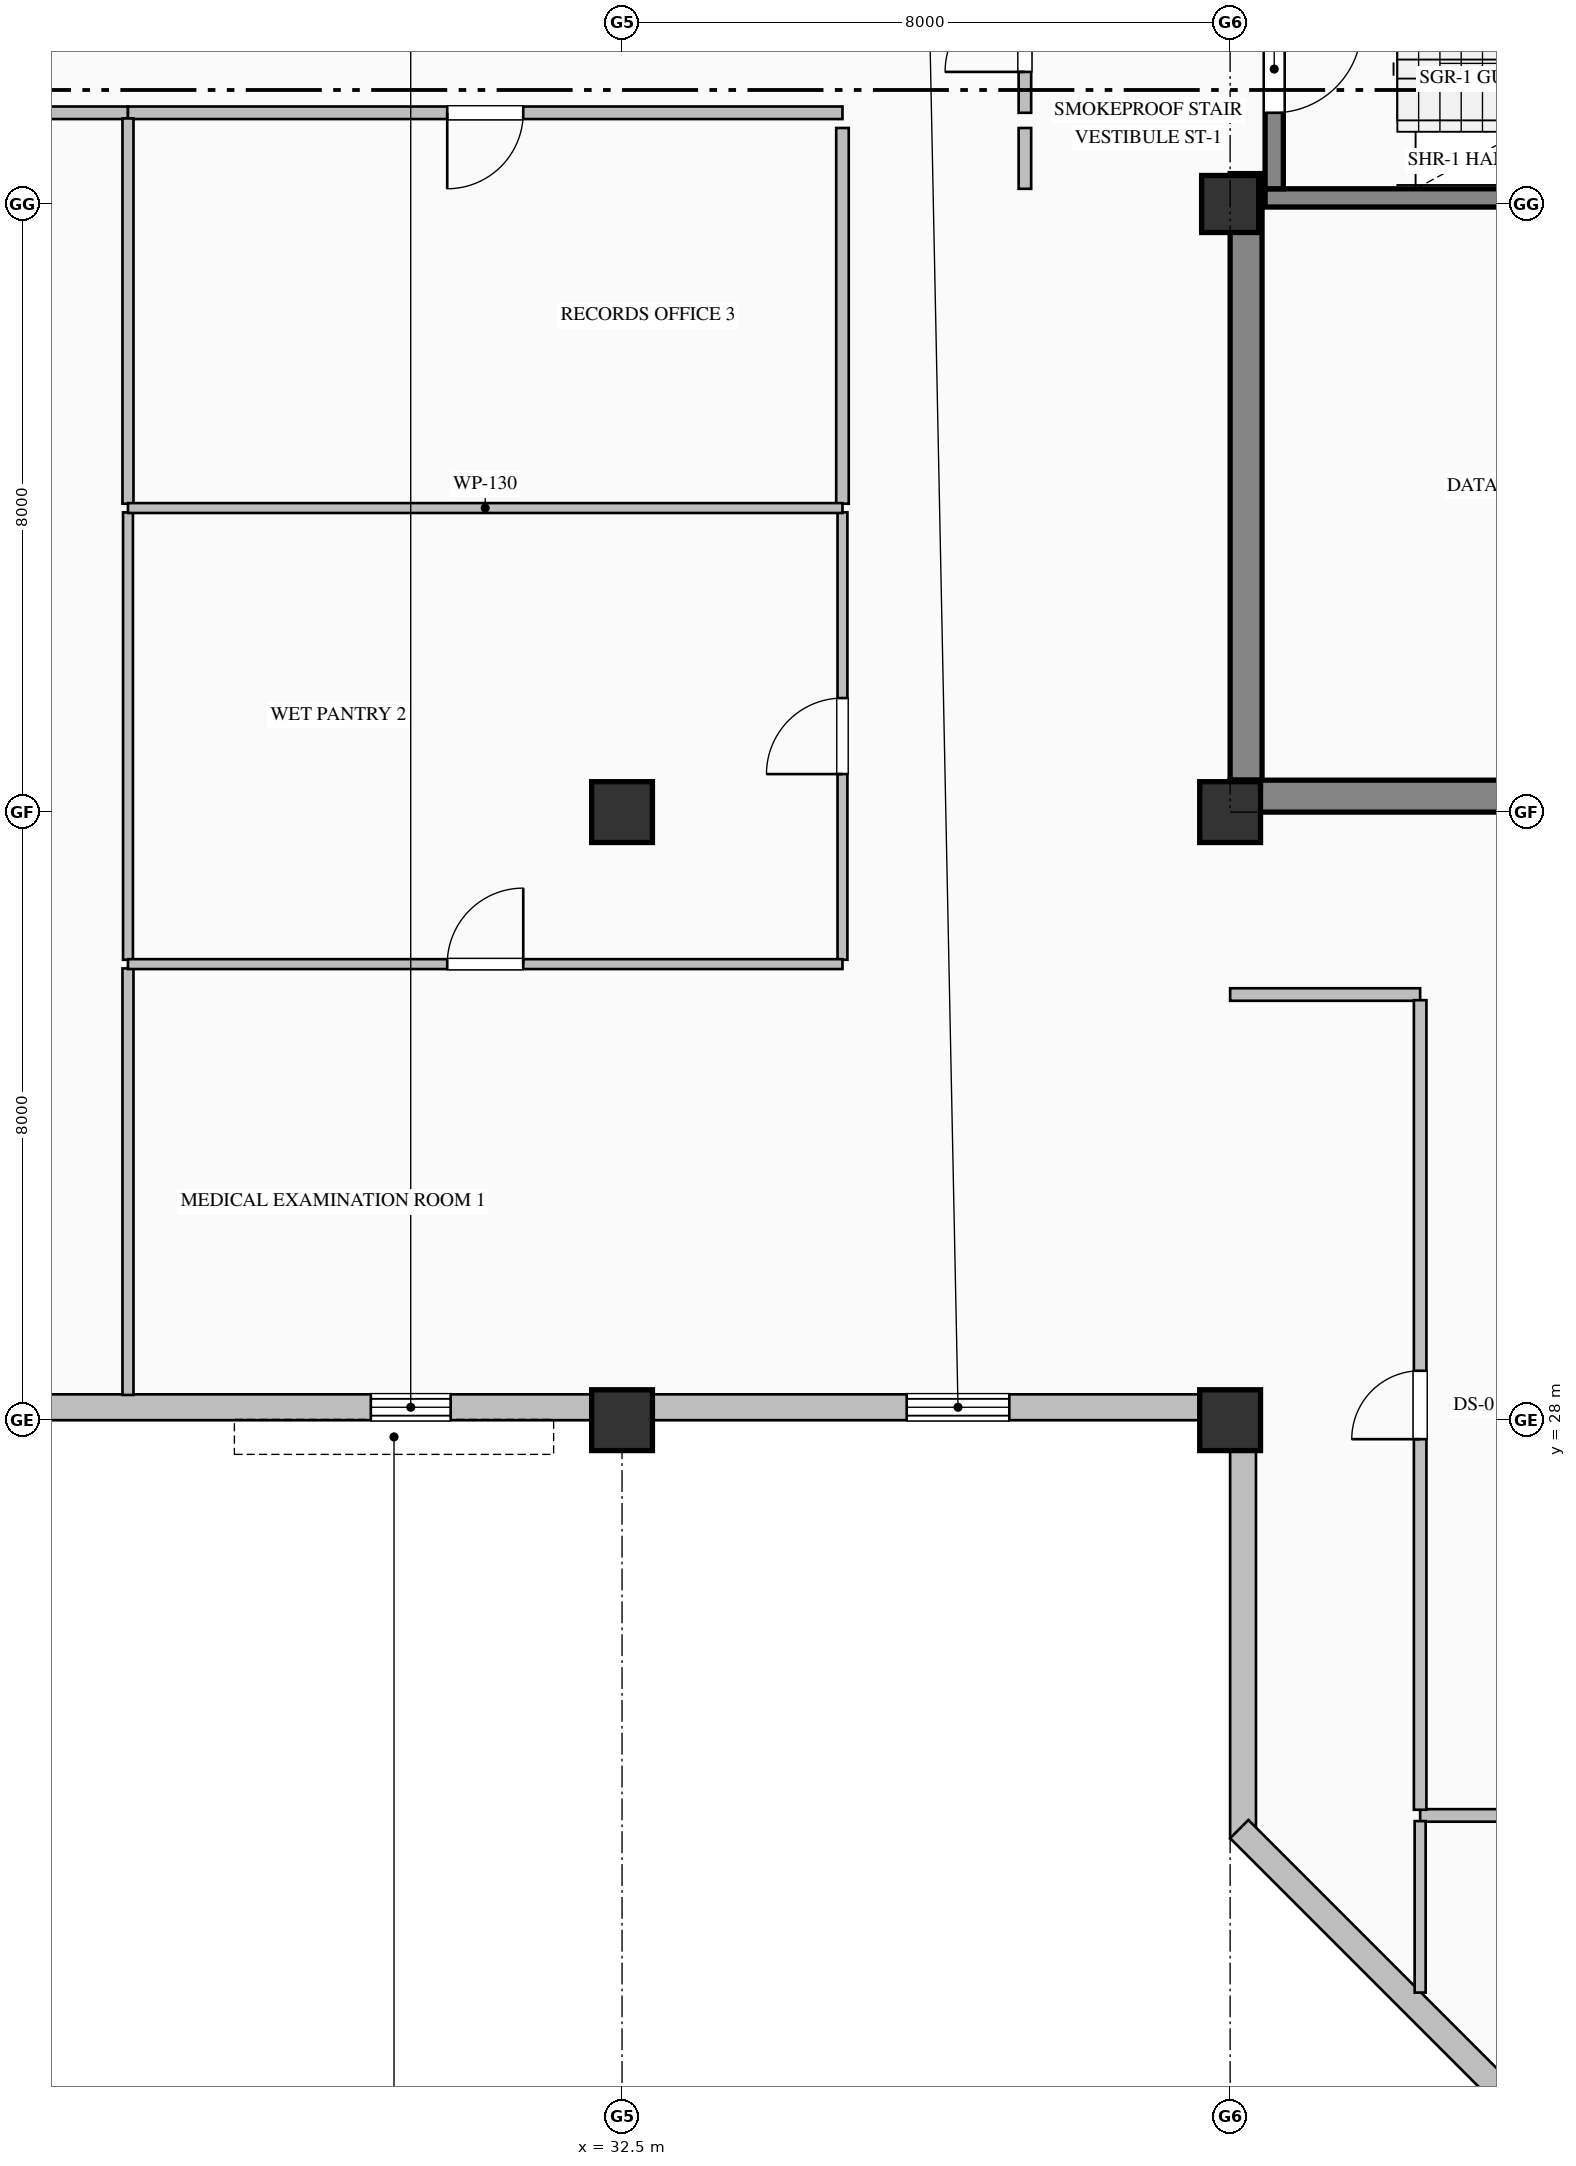
"""IFC4 building model, lengths in metres.
Left out: names, types, materials, properties, quantities, classifications, styles, units other than length and angle.
Written with IfcOpenShell. Run it as: python <this file> out.ifc"""

import sys

from ifc_helpers import new_model, si_unit, direction, frame, frame_2d, origin, origin_2d, place, context, subcontext, project, spatial, rectangle, hollow_rectangle, extrude, element, fill, save


model = new_model("IFC4")
c1 = context("Model", 3, precision=1e-05, world=origin(), true_north=direction((0.0, 1.0)))
c2 = subcontext(c1, "Body", "Model", "MODEL_VIEW")
j1 = project(units=[si_unit("LENGTHUNIT", "METRE"), si_unit("PLANEANGLEUNIT", "RADIAN")], contexts=[c1])
p1 = place(None, origin())
s1 = spatial("IfcSite", under=j1, at=p1, CompositionType="ELEMENT")
p2 = place(p1, origin())
s2 = spatial("IfcBuilding", under=s1, at=p2, CompositionType="ELEMENT")
p3 = place(p2, frame((0.0, 0.0, 339.2)))
s3 = spatial("IfcBuildingStorey", under=s2, at=p3, CompositionType="ELEMENT", Elevation=339.2)
p4 = place(p3, frame((40.71, 36.42, 0.0), z_axis=(0.0, 0.0, 1.0), x_axis=(0.0, 1.0, 0.0)))
e1 = element("IfcWall", 1, at=p4, inside=s3, PredefinedType="SHEAR", context=c2, shape_type="SweptSolid", body=[
    extrude(rectangle(XDim=7.98, YDim=0.42, at=frame_2d((3.99, 0.0))), origin(), (0.0, 0.0, 1.0), 3.785),
])
p5 = place(p3, frame((40.5, 36.21, 0.0), z_axis=(0.0, 0.0, 1.0), x_axis=(1.0, 0.0, 0.0)))
e2 = element("IfcWall", 2, at=p5, inside=s3, PredefinedType="SHEAR", context=c2, shape_type="SweptSolid", body=[
    extrude(rectangle(XDim=9.1, YDim=0.42, at=frame_2d((4.55, 0.0))), origin(), (0.0, 0.0, 1.0), 3.785),
])
for number, where, z_axis, x_axis in (
    (3, (32.5, 28.0, 0.0), (0.0, 0.0, 1.0), (1.0, 0.0, 0.0)),
    (4, (32.5, 36.0, 0.0), (0.0, 0.0, 1.0), (1.0, 0.0, 0.0)),
    (5, (40.5, 28.0, 0.0), (0.0, 0.0, 1.0), (1.0, 0.0, 0.0)),
    (6, (40.5, 36.0, 0.0), (0.0, 0.0, 1.0), (1.0, 0.0, 0.0)),
):
    element("IfcColumn", number, at=place(p3, frame(where, z_axis=z_axis, x_axis=x_axis)), inside=s3, PredefinedType="COLUMN", context=c2, shape_type="SweptSolid", body=[
        extrude(hollow_rectangle(XDim=0.8, YDim=0.8, WallThickness=0.032, at=origin_2d()), origin(), (0.0, 0.0, 1.0), 4.0),
    ])
p6 = place(p3, frame((40.5, 44.0, 0.0), z_axis=(0.0, 0.0, 1.0), x_axis=(1.0, 0.0, 0.0)))
e7 = element("IfcColumn", 7, at=p6, inside=s3, PredefinedType="COLUMN", context=c2, shape_type="SweptSolid", body=[
    extrude(rectangle(XDim=0.75, YDim=0.75, at=origin_2d()), origin(), (0.0, 0.0, 1.0), 4.0),
])
p7 = place(p3, frame((40.67, 22.5, 0.0), z_axis=(0.0, 0.0, 1.0), x_axis=(0.0, 1.0, 0.0)))
e8 = element("IfcWall", 8, at=p7, inside=s3, PredefinedType="SOLIDWALL", context=c2, shape_type="SweptSolid", body=[
    extrude(rectangle(XDim=5.84, YDim=0.34, at=frame_2d((2.92, 0.0))), origin(), (0.0, 0.0, 1.0), 3.185),
])
p8 = place(p3, frame((40.52, 28.17, 0.0), z_axis=(0.0, 0.0, 1.0), x_axis=(-1.0, 0.0, 0.0)))
e9 = element("IfcWall", 9, at=p8, inside=s3, PredefinedType="SOLIDWALL", context=c2, shape_type="SweptSolid", body=[
    extrude(rectangle(XDim=20.02, YDim=0.34, at=frame_2d((10.01, 0.0))), origin(), (0.0, 0.0, 1.0), 3.185),
])
p9 = place(p8, frame((2.925, 0.0, 0.9)))
e10 = element("IfcOpeningElement", 10, at=p9, cuts=e9, PredefinedType="OPENING", context=c2, shape_type="SweptSolid", body=[
    extrude(rectangle(XDim=1.35, YDim=1.85, at=frame_2d((0.675, 0.925))), frame((0.0, 0.18, 0.0), z_axis=(0.0, -1.0, 0.0), x_axis=(1.0, 0.0, 0.0)), (0.0, 0.0, 1.0), 0.36),
])
p10 = place(p8, frame((10.275, 0.0, 0.8)))
e11 = element("IfcOpeningElement", 11, at=p10, cuts=e9, PredefinedType="OPENING", context=c2, shape_type="SweptSolid", body=[
    extrude(rectangle(XDim=1.05, YDim=2.15, at=frame_2d((0.525, 1.075))), frame((0.0, 0.18, 0.0), z_axis=(0.0, -1.0, 0.0), x_axis=(1.0, 0.0, 0.0)), (0.0, 0.0, 1.0), 0.36),
])
p11 = place(p3, frame((44.62, 18.62, 0.0), z_axis=(0.0, 0.0, 1.0), x_axis=(-0.707106781187, 0.707106781187, 0.0)))
e12 = element("IfcWall", 12, at=p11, inside=s3, PredefinedType="SOLIDWALL", context=c2, shape_type="SweptSolid", body=[
    extrude(rectangle(XDim=5.657, YDim=0.34, at=frame_2d((2.828, 0.0))), origin(), (0.0, 0.0, 1.0), 3.785),
])
p12 = place(p3, frame((49.04, 44.08, 0.0), z_axis=(0.0, 0.0, 1.0), x_axis=(-1.0, 0.0, 0.0)))
e13 = element("IfcWall", 13, at=p12, inside=s3, PredefinedType="SOLIDWALL", context=c2, shape_type="SweptSolid", body=[
    extrude(rectangle(XDim=8.08, YDim=0.24, at=frame_2d((4.04, 0.0))), origin(), (0.0, 0.0, 1.0), 4.0),
])
p13 = place(p3, frame((41.08, 47.35, 0.0), z_axis=(0.0, 0.0, 1.0), x_axis=(0.0, -1.0, 0.0)))
e14 = element("IfcWall", 14, at=p13, inside=s3, PredefinedType="SOLIDWALL", context=c2, shape_type="SweptSolid", body=[
    extrude(rectangle(XDim=3.15, YDim=0.24, at=frame_2d((1.575, 0.0))), origin(), (0.0, 0.0, 1.0), 4.0),
])
p14 = place(p13, frame((1.0, 0.0, 0.0)))
e15 = element("IfcOpeningElement", 15, at=p14, cuts=e14, PredefinedType="OPENING", context=c2, shape_type="SweptSolid", body=[
    extrude(rectangle(XDim=1.15, YDim=2.2, at=frame_2d((0.575, 1.1))), frame((0.0, 0.13, 0.0), z_axis=(0.0, -1.0, 0.0), x_axis=(1.0, 0.0, 0.0)), (0.0, 0.0, 1.0), 0.26),
])
p15 = place(p3, frame((37.8, 45.2, 0.0), z_axis=(0.0, 0.0, 1.0), x_axis=(0.0, 1.0, 0.0)))
e16 = element("IfcWall", 16, at=p15, inside=s3, PredefinedType="PARTITIONING", context=c2, shape_type="SweptSolid", body=[
    extrude(rectangle(XDim=2.125, YDim=0.165, at=frame_2d((1.063, 0.0))), origin(), (0.0, 0.0, 1.0), 3.785),
])
p16 = place(p15, frame((0.538, 0.0, 0.0)))
e17 = element("IfcOpeningElement", 17, at=p16, cuts=e16, PredefinedType="OPENING", context=c2, shape_type="SweptSolid", body=[
    extrude(rectangle(XDim=1.05, YDim=2.15, at=frame_2d((0.525, 1.075))), frame((0.0, 0.093, 0.0), z_axis=(0.0, -1.0, 0.0), x_axis=(1.0, 0.0, 0.0)), (0.0, 0.0, 1.0), 0.185),
])
p17 = place(p3, frame((37.8, 44.2, 0.0), z_axis=(0.0, 0.0, 1.0), x_axis=(0.0, 1.0, 0.0)))
e18 = element("IfcWall", 18, at=p17, inside=s3, PredefinedType="PARTITIONING", context=c2, shape_type="SweptSolid", body=[
    extrude(rectangle(XDim=0.8, YDim=0.165, at=frame_2d((0.4, 0.0))), origin(), (0.0, 0.0, 1.0), 3.785),
])
p18 = place(p3, frame((26.0, 45.2, 0.0), z_axis=(0.0, 0.0, 1.0), x_axis=(-1.0, 0.0, 0.0)))
e19 = element("IfcWall", 19, at=p18, inside=s3, PredefinedType="PARTITIONING", context=c2, shape_type="SweptSolid", body=[
    extrude(rectangle(XDim=5.5, YDim=0.165, at=frame_2d((2.75, 0.0))), origin(), (0.0, 0.0, 1.0), 3.785),
])
p19 = place(p18, frame((2.25, 0.0, 0.0)))
e20 = element("IfcOpeningElement", 20, at=p19, cuts=e19, PredefinedType="OPENING", context=c2, shape_type="SweptSolid", body=[
    extrude(rectangle(XDim=1.0, YDim=2.15, at=frame_2d((0.5, 1.075))), frame((0.0, 0.093, 0.0), z_axis=(0.0, -1.0, 0.0), x_axis=(1.0, 0.0, 0.0)), (0.0, 0.0, 1.0), 0.185),
])
p20 = place(p3, frame((35.4, 45.2, 0.0), z_axis=(0.0, 0.0, 1.0), x_axis=(-1.0, 0.0, 0.0)))
e21 = element("IfcWall", 21, at=p20, inside=s3, PredefinedType="PARTITIONING", context=c2, shape_type="SweptSolid", body=[
    extrude(rectangle(XDim=9.4, YDim=0.165, at=frame_2d((4.7, 0.0))), origin(), (0.0, 0.0, 1.0), 3.785),
])
p21 = place(p20, frame((4.2, 0.0, 0.0)))
e22 = element("IfcOpeningElement", 22, at=p21, cuts=e21, PredefinedType="OPENING", context=c2, shape_type="SweptSolid", body=[
    extrude(rectangle(XDim=1.0, YDim=2.15, at=frame_2d((0.5, 1.075))), frame((0.0, 0.093, 0.0), z_axis=(0.0, -1.0, 0.0), x_axis=(1.0, 0.0, 0.0)), (0.0, 0.0, 1.0), 0.185),
])
p22 = place(p3, frame((35.4, 34.057, 0.0), z_axis=(0.0, 0.0, 1.0), x_axis=(0.0, 1.0, 0.0)))
e23 = element("IfcWall", 23, at=p22, inside=s3, PredefinedType="PARTITIONING", context=c2, shape_type="SweptSolid", body=[
    extrude(rectangle(XDim=5.886, YDim=0.13, at=frame_2d((2.943, 0.0))), origin(), (0.0, 0.0, 1.0), 3.785),
])
p23 = place(p22, frame((2.443, 0.0, 0.0)))
e24 = element("IfcOpeningElement", 24, at=p23, cuts=e23, PredefinedType="OPENING", context=c2, shape_type="SweptSolid", body=[
    extrude(rectangle(XDim=1.0, YDim=2.15, at=frame_2d((0.5, 1.075))), frame((0.0, 0.075, 0.0), z_axis=(0.0, -1.0, 0.0), x_axis=(1.0, 0.0, 0.0)), (0.0, 0.0, 1.0), 0.15),
])
p24 = place(p3, frame((35.4, 40.057, 0.0), z_axis=(0.0, 0.0, 1.0), x_axis=(0.0, 1.0, 0.0)))
e25 = element("IfcWall", 25, at=p24, inside=s3, PredefinedType="PARTITIONING", context=c2, shape_type="SweptSolid", body=[
    extrude(rectangle(XDim=4.943, YDim=0.165, at=frame_2d((2.472, 0.0))), origin(), (0.0, 0.0, 1.0), 3.785),
])
p25 = place(p3, frame((43.0, 33.6, 0.0), z_axis=(0.0, 0.0, 1.0), x_axis=(-1.0, 0.0, 0.0)))
e26 = element("IfcWall", 26, at=p25, inside=s3, PredefinedType="PARTITIONING", context=c2, shape_type="SweptSolid", body=[
    extrude(rectangle(XDim=2.5, YDim=0.165, at=frame_2d((1.25, 0.0))), origin(), (0.0, 0.0, 1.0), 3.785),
])
p26 = place(p3, frame((45.2, 22.8, 0.0), z_axis=(0.0, 0.0, 1.0), x_axis=(-1.0, 0.0, 0.0)))
e27 = element("IfcWall", 27, at=p26, inside=s3, PredefinedType="PARTITIONING", context=c2, shape_type="SweptSolid", body=[
    extrude(rectangle(XDim=2.2, YDim=0.165, at=frame_2d((1.1, 0.0))), origin(), (0.0, 0.0, 1.0), 3.785),
])
p27 = place(p3, frame((43.0, 22.875, 0.0), z_axis=(0.0, 0.0, 1.0), x_axis=(0.0, 1.0, 0.0)))
e28 = element("IfcWall", 28, at=p27, inside=s3, PredefinedType="PARTITIONING", context=c2, shape_type="SweptSolid", body=[
    extrude(rectangle(XDim=10.651, YDim=0.165, at=frame_2d((5.325, 0.0))), origin(), (0.0, 0.0, 1.0), 3.785),
])
p28 = place(p27, frame((4.875, 0.0, 0.0)))
e29 = element("IfcOpeningElement", 29, at=p28, cuts=e28, PredefinedType="OPENING", context=c2, shape_type="SweptSolid", body=[
    extrude(rectangle(XDim=0.9, YDim=2.15, at=frame_2d((0.45, 1.075))), frame((0.0, 0.093, 0.0), z_axis=(0.0, -1.0, 0.0), x_axis=(1.0, 0.0, 0.0)), (0.0, 0.0, 1.0), 0.185),
])
p29 = place(p3, frame((43.0, 20.469, 0.0), z_axis=(0.0, 0.0, 1.0), x_axis=(0.0, 1.0, 0.0)))
e30 = element("IfcWall", 30, at=p29, inside=s3, PredefinedType="PARTITIONING", context=c2, shape_type="SweptSolid", body=[
    extrude(rectangle(XDim=2.256, YDim=0.145, at=frame_2d((1.128, 0.0))), origin(), (0.0, 0.0, 1.0), 3.785),
])
p30 = place(p3, frame((26.0, 33.943, 0.0), z_axis=(0.0, 0.0, 1.0), x_axis=(0.0, -1.0, 0.0)))
e31 = element("IfcWall", 31, at=p30, inside=s3, PredefinedType="PARTITIONING", context=c2, shape_type="SweptSolid", body=[
    extrude(rectangle(XDim=5.611, YDim=0.145, at=frame_2d((2.806, 0.0))), origin(), (0.0, 0.0, 1.0), 3.785),
])
p31 = place(p3, frame((26.0, 39.943, 0.0), z_axis=(0.0, 0.0, 1.0), x_axis=(0.0, -1.0, 0.0)))
e32 = element("IfcWall", 32, at=p31, inside=s3, PredefinedType="PARTITIONING", context=c2, shape_type="SweptSolid", body=[
    extrude(rectangle(XDim=5.886, YDim=0.13, at=frame_2d((2.943, 0.0))), origin(), (0.0, 0.0, 1.0), 3.785),
])
p32 = place(p3, frame((26.0, 45.125, 0.0), z_axis=(0.0, 0.0, 1.0), x_axis=(0.0, -1.0, 0.0)))
e33 = element("IfcWall", 33, at=p32, inside=s3, PredefinedType="PARTITIONING", context=c2, shape_type="SweptSolid", body=[
    extrude(rectangle(XDim=5.069, YDim=0.145, at=frame_2d((2.534, 0.0))), origin(), (0.0, 0.0, 1.0), 3.785),
])
p33 = place(p3, frame((26.0, 34.0, 0.0), z_axis=(0.0, 0.0, 1.0), x_axis=(1.0, 0.0, 0.0)))
e34 = element("IfcWall", 34, at=p33, inside=s3, PredefinedType="PARTITIONING", context=c2, shape_type="SweptSolid", body=[
    extrude(rectangle(XDim=9.4, YDim=0.13, at=frame_2d((4.7, 0.0))), origin(), (0.0, 0.0, 1.0), 3.785),
])
p34 = place(p33, frame((4.2, 0.0, 0.0)))
e35 = element("IfcOpeningElement", 35, at=p34, cuts=e34, PredefinedType="OPENING", context=c2, shape_type="SweptSolid", body=[
    extrude(rectangle(XDim=1.0, YDim=2.15, at=frame_2d((0.5, 1.075))), frame((0.0, 0.075, 0.0), z_axis=(0.0, -1.0, 0.0), x_axis=(1.0, 0.0, 0.0)), (0.0, 0.0, 1.0), 0.15),
])
p35 = place(p3, frame((26.0, 40.0, 0.0), z_axis=(0.0, 0.0, 1.0), x_axis=(1.0, 0.0, 0.0)))
e36 = element("IfcWall", 36, at=p35, inside=s3, PredefinedType="PARTITIONING", context=c2, shape_type="SweptSolid", body=[
    extrude(rectangle(XDim=9.4, YDim=0.13, at=frame_2d((4.7, 0.0))), origin(), (0.0, 0.0, 1.0), 3.785),
])
p36 = place(p9, origin())
e37 = element("IfcWindow", 37, at=p36, inside=s3, PartitioningType="DOUBLE_PANEL_VERTICAL", PredefinedType="WINDOW", context=c2, shape_type="SweptSolid", body=[
    extrude(rectangle(XDim=1.35, YDim=1.85, at=frame_2d((0.675, 0.925))), frame((0.0, 0.15, 0.0), z_axis=(0.0, -1.0, 0.0), x_axis=(1.0, 0.0, 0.0)), (0.0, 0.0, 1.0), 0.06),
])
fill(e10, e37)
p37 = place(p10, origin())
e38 = element("IfcWindow", 38, at=p37, inside=s3, PartitioningType="SINGLE_PANEL", PredefinedType="WINDOW", context=c2, shape_type="SweptSolid", body=[
    extrude(rectangle(XDim=1.05, YDim=2.15, at=frame_2d((0.525, 1.075))), frame((0.0, 0.15, 0.0), z_axis=(0.0, -1.0, 0.0), x_axis=(1.0, 0.0, 0.0)), (0.0, 0.0, 1.0), 0.06),
])
fill(e11, e38)
p38 = place(p14, origin())
e39 = element("IfcDoor", 39, at=p38, inside=s3, OperationType="SINGLE_SWING_LEFT", PredefinedType="DOOR", context=c2, shape_type="SweptSolid", body=[
    extrude(rectangle(XDim=1.15, YDim=2.2, at=frame_2d((0.575, 1.1))), frame((0.0, 0.025, 0.0), z_axis=(0.0, -1.0, 0.0), x_axis=(1.0, 0.0, 0.0)), (0.0, 0.0, 1.0), 0.05),
])
fill(e15, e39)
p39 = place(p16, origin())
e40 = element("IfcDoor", 40, at=p39, inside=s3, OperationType="SINGLE_SWING_LEFT", PredefinedType="DOOR", context=c2, shape_type="SweptSolid", body=[
    extrude(rectangle(XDim=1.05, YDim=2.15, at=frame_2d((0.525, 1.075))), frame((0.0, 0.025, 0.0), z_axis=(0.0, -1.0, 0.0), x_axis=(1.0, 0.0, 0.0)), (0.0, 0.0, 1.0), 0.05),
])
fill(e17, e40)
p40 = place(p34, origin())
e41 = element("IfcDoor", 41, at=p40, inside=s3, OperationType="SINGLE_SWING_RIGHT", PredefinedType="DOOR", context=c2, shape_type="SweptSolid", body=[
    extrude(rectangle(XDim=1.0, YDim=2.15, at=frame_2d((0.5, 1.075))), frame((0.0, 0.025, 0.0), z_axis=(0.0, -1.0, 0.0), x_axis=(1.0, 0.0, 0.0)), (0.0, 0.0, 1.0), 0.05),
])
fill(e35, e41)
p41 = place(p23, origin())
e42 = element("IfcDoor", 42, at=p41, inside=s3, OperationType="SINGLE_SWING_LEFT", PredefinedType="DOOR", context=c2, shape_type="SweptSolid", body=[
    extrude(rectangle(XDim=1.0, YDim=2.15, at=frame_2d((0.5, 1.075))), frame((0.0, 0.025, 0.0), z_axis=(0.0, -1.0, 0.0), x_axis=(1.0, 0.0, 0.0)), (0.0, 0.0, 1.0), 0.05),
])
fill(e24, e42)
p42 = place(p21, origin())
e43 = element("IfcDoor", 43, at=p42, inside=s3, OperationType="SINGLE_SWING_RIGHT", PredefinedType="DOOR", context=c2, shape_type="SweptSolid", body=[
    extrude(rectangle(XDim=1.0, YDim=2.15, at=frame_2d((0.5, 1.075))), frame((0.0, 0.025, 0.0), z_axis=(0.0, -1.0, 0.0), x_axis=(1.0, 0.0, 0.0)), (0.0, 0.0, 1.0), 0.05),
])
fill(e22, e43)
p43 = place(p28, origin())
e44 = element("IfcDoor", 44, at=p43, inside=s3, OperationType="SINGLE_SWING_LEFT", PredefinedType="DOOR", context=c2, shape_type="SweptSolid", body=[
    extrude(rectangle(XDim=0.9, YDim=2.15, at=frame_2d((0.45, 1.075))), frame((0.0, 0.025, 0.0), z_axis=(0.0, -1.0, 0.0), x_axis=(1.0, 0.0, 0.0)), (0.0, 0.0, 1.0), 0.05),
])
fill(e29, e44)
save(model, sys.argv[1])
